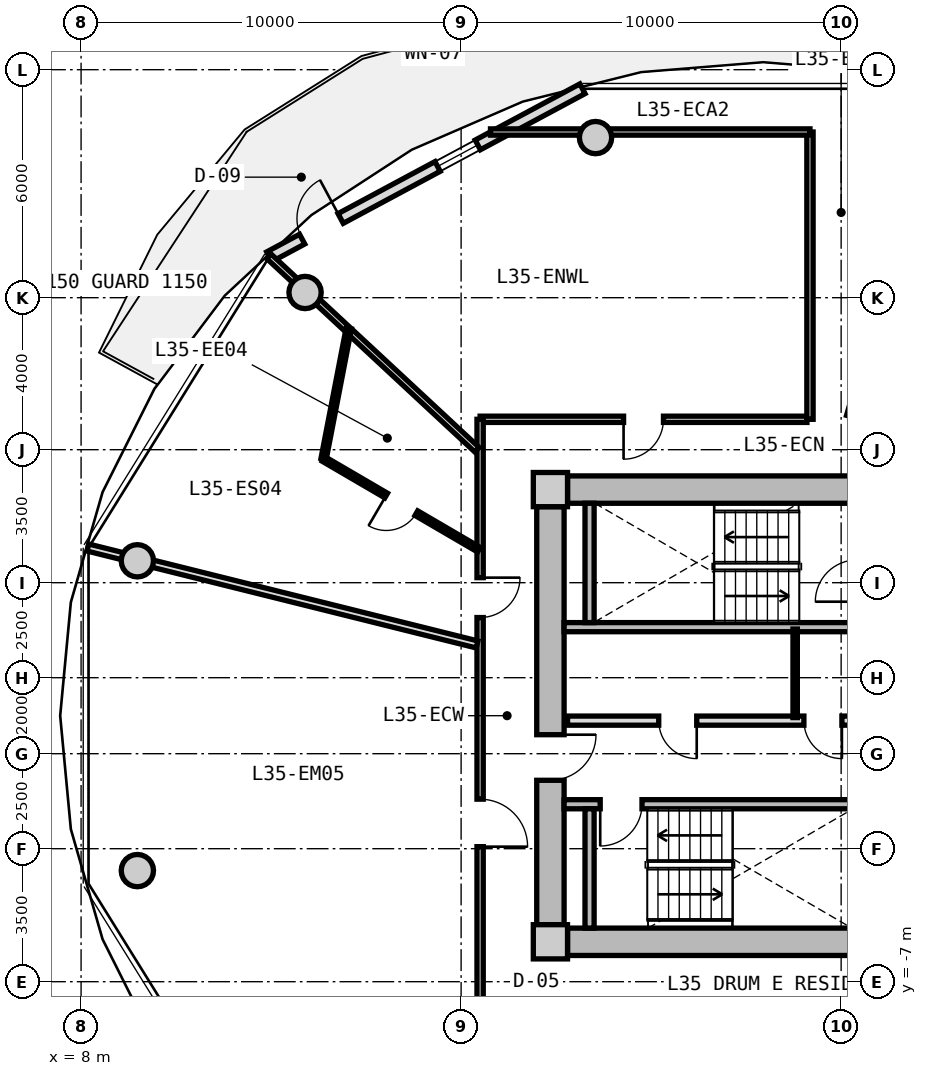
"""IFC4 building model, lengths in metres.
Left out: names, types, materials, properties, quantities, classifications, styles, units other than length and angle.
Written with IfcOpenShell. Run it as: python <this file> out.ifc"""

import sys

from ifc_helpers import new_model, si_unit, direction, frame, frame_2d, origin, origin_2d, place, context, subcontext, project, spatial, rectangle, circle, extrude, source, transform, mapped, element, fill, save


model = new_model("IFC4")
c1 = context("Model", 3, precision=1e-05, world=origin(), true_north=direction((0.0, 1.0)))
c2 = subcontext(c1, "Body", "Model", "MODEL_VIEW")
j1 = project(units=[si_unit("LENGTHUNIT", "METRE"), si_unit("PLANEANGLEUNIT", "RADIAN")], contexts=[c1])
p1 = place(None, origin())
s1 = spatial("IfcSite", under=j1, at=p1, CompositionType="ELEMENT")
p2 = place(p1, origin())
s2 = spatial("IfcBuilding", under=s1, at=p2, CompositionType="ELEMENT")
p3 = place(p2, frame((0.0, 0.0, 114.55)))
s3 = spatial("IfcBuildingStorey", under=s2, at=p3, CompositionType="ELEMENT", Elevation=114.55)
m1 = source(origin(), c2, "Body", "SweptSolid", [
    extrude(rectangle(XDim=0.9, YDim=0.9, at=origin_2d()), origin(), (0.0, 0.0, 1.0), 3.05),
])
for number, where, z_axis, x_axis in (
    (1, (20.35, -5.95, 0.0), (0.0, 0.0, 1.0), (1.0, 0.0, 0.0)),
    (2, (20.35, 5.95, 0.0), (0.0, 0.0, 1.0), (1.0, 0.0, 0.0)),
):
    element("IfcColumn", number, at=place(p3, frame(where, z_axis=z_axis, x_axis=x_axis)), inside=s3, PredefinedType="COLUMN", context=c2, shape_type="MappedRepresentation", body=[
        mapped(m1, transform((0.0, 0.0, 0.0), x_axis=(1.0, 0.0, 0.0), y_axis=(0.0, 1.0, 0.0), z_axis=(0.0, 0.0, 1.0), scale=1.0)),
    ])
m2 = source(origin(), c2, "Body", "SweptSolid", [
    extrude(rectangle(XDim=14.4, YDim=0.72, at=frame_2d((7.2, 0.0))), origin(), (0.0, 0.0, 1.0), 2.79),
])
for number, where, z_axis, x_axis in (
    (3, (20.8, 5.95, 0.0), (0.0, 0.0, 1.0), (1.0, 0.0, 0.0)),
    (4, (35.2, -5.95, 0.0), (0.0, 0.0, 1.0), (-1.0, 0.0, 0.0)),
):
    element("IfcWall", number, at=place(p3, frame(where, z_axis=z_axis, x_axis=x_axis)), inside=s3, PredefinedType="SHEAR", context=c2, shape_type="MappedRepresentation", body=[
        mapped(m2, transform((0.0, 0.0, 0.0), x_axis=(1.0, 0.0, 0.0), y_axis=(0.0, 1.0, 0.0), z_axis=(0.0, 0.0, 1.0), scale=1.0)),
    ])
m3 = source(origin(), c2, "Body", "SweptSolid", [
    extrude(rectangle(XDim=11.0, YDim=0.72, at=frame_2d((5.5, 0.0))), origin(), (0.0, 0.0, 1.0), 2.79),
])
p4 = place(p3, frame((20.35, -5.5, 0.0), z_axis=(0.0, 0.0, 1.0), x_axis=(0.0, 1.0, 0.0)))
e5 = element("IfcWall", 5, at=p4, inside=s3, PredefinedType="SHEAR", context=c2, shape_type="MappedRepresentation", body=[
    mapped(m3, transform((0.0, 0.0, 0.0), x_axis=(1.0, 0.0, 0.0), y_axis=(0.0, 1.0, 0.0), z_axis=(0.0, 0.0, 1.0), scale=1.0)),
])
p5 = place(p4, frame((3.8, 0.0, 0.0)))
e6 = element("IfcOpeningElement", 6, at=p5, cuts=e5, PredefinedType="OPENING", context=c2, shape_type="SweptSolid", body=[
    extrude(rectangle(XDim=1.2, YDim=2.15, at=frame_2d((0.6, 1.075))), frame((0.0, 0.37, 0.0), z_axis=(0.0, -1.0, 0.0), x_axis=(1.0, 0.0, 0.0)), (0.0, 0.0, 1.0), 0.74),
])
m4 = source(origin(), c2, "Body", "SweptSolid", [
    extrude(circle(Radius=0.425, at=origin_2d()), origin(), (0.0, 0.0, 1.0), 3.05),
])
for number, where, z_axis, x_axis in (
    (7, (21.537, 15.213, 0.0), (0.0, 0.0, 1.0), (1.0, 0.0, 0.0)),
    (8, (13.894, 11.137, 0.0), (0.0, 0.0, 1.0), (1.0, 0.0, 0.0)),
    (9, (9.481, 4.076, 0.0), (0.0, 0.0, 1.0), (1.0, 0.0, 0.0)),
    (10, (9.481, -4.076, 0.0), (0.0, 0.0, 1.0), (1.0, 0.0, 0.0)),
):
    element("IfcColumn", number, at=place(p3, frame(where, z_axis=z_axis, x_axis=x_axis)), inside=s3, PredefinedType="COLUMN", context=c2, shape_type="MappedRepresentation", body=[
        mapped(m4, transform((0.0, 0.0, 0.0), x_axis=(1.0, 0.0, 0.0), y_axis=(0.0, 1.0, 0.0), z_axis=(0.0, 0.0, 1.0), scale=1.0)),
    ])
m5 = source(origin(), c2, "Body", "SweptSolid", [
    extrude(rectangle(XDim=9.351, YDim=0.29, at=frame_2d((4.675, 0.0))), origin(), (0.0, 0.0, 1.0), 2.79),
])
p6 = place(p3, frame((12.953, 12.077, 0.0), z_axis=(0.0, 0.0, 1.0), x_axis=(0.881184411073, 0.472772708267, 0.0)))
e11 = element("IfcWall", 11, at=p6, inside=s3, PredefinedType="SOLIDWALL", context=c2, shape_type="MappedRepresentation", body=[
    mapped(m5, transform((0.0, 0.0, 0.0), x_axis=(1.0, 0.0, 0.0), y_axis=(0.0, 1.0, 0.0), z_axis=(0.0, 0.0, 1.0), scale=1.0)),
])
p7 = place(p6, frame((0.98, 0.0, 0.0)))
e12 = element("IfcOpeningElement", 12, at=p7, cuts=e11, PredefinedType="OPENING", context=c2, shape_type="SweptSolid", body=[
    extrude(rectangle(XDim=1.15, YDim=2.25, at=frame_2d((0.575, 1.125))), frame((0.0, 0.155, 0.0), z_axis=(0.0, -1.0, 0.0), x_axis=(1.0, 0.0, 0.0)), (0.0, 0.0, 1.0), 0.31),
])
p8 = place(p6, frame((5.025, 0.0, 0.85)))
e13 = element("IfcOpeningElement", 13, at=p8, cuts=e11, PredefinedType="OPENING", context=c2, shape_type="SweptSolid", body=[
    extrude(rectangle(XDim=1.2, YDim=1.5, at=frame_2d((0.6, 0.75))), frame((0.0, 0.155, 0.0), z_axis=(0.0, -1.0, 0.0), x_axis=(1.0, 0.0, 0.0)), (0.0, 0.0, 1.0), 0.31),
])
m6 = source(origin(), c2, "Body", "SweptSolid", [
    extrude(rectangle(XDim=7.83, YDim=0.24, at=frame_2d((3.915, 0.0))), origin(), (0.0, 0.0, 1.0), 2.79),
])
p9 = place(p3, frame((20.71, 2.33, 0.0), z_axis=(0.0, 0.0, 1.0), x_axis=(1.0, 0.0, 0.0)))
e14 = element("IfcWall", 14, at=p9, inside=s3, PredefinedType="PARTITIONING", context=c2, shape_type="MappedRepresentation", body=[
    mapped(m6, transform((0.0, 0.0, 0.0), x_axis=(1.0, 0.0, 0.0), y_axis=(0.0, 1.0, 0.0), z_axis=(0.0, 0.0, 1.0), scale=1.0)),
])
m7 = source(origin(), c2, "Body", "SweptSolid", [
    extrude(rectangle(XDim=3.14, YDim=0.24, at=frame_2d((1.57, 0.0))), origin(), (0.0, 0.0, 1.0), 2.79),
])
p10 = place(p3, frame((21.38, 2.45, 0.0), z_axis=(0.0, 0.0, 1.0), x_axis=(0.0, 1.0, 0.0)))
e15 = element("IfcWall", 15, at=p10, inside=s3, PredefinedType="PARTITIONING", context=c2, shape_type="MappedRepresentation", body=[
    mapped(m7, transform((0.0, 0.0, 0.0), x_axis=(1.0, 0.0, 0.0), y_axis=(0.0, 1.0, 0.0), z_axis=(0.0, 0.0, 1.0), scale=1.0)),
])
p11 = place(p3, frame((20.71, -2.33, 0.0), z_axis=(0.0, 0.0, 1.0), x_axis=(1.0, 0.0, 0.0)))
e16 = element("IfcWall", 16, at=p11, inside=s3, PredefinedType="PARTITIONING", context=c2, shape_type="MappedRepresentation", body=[
    mapped(m6, transform((0.0, 0.0, 0.0), x_axis=(1.0, 0.0, 0.0), y_axis=(0.0, 1.0, 0.0), z_axis=(0.0, 0.0, 1.0), scale=1.0)),
])
p12 = place(p11, frame((0.95, 0.0, 0.0)))
e17 = element("IfcOpeningElement", 17, at=p12, cuts=e16, PredefinedType="OPENING", context=c2, shape_type="SweptSolid", body=[
    extrude(rectangle(XDim=1.1, YDim=2.15, at=frame_2d((0.55, 1.075))), frame((0.0, 0.13, 0.0), z_axis=(0.0, -1.0, 0.0), x_axis=(1.0, 0.0, 0.0)), (0.0, 0.0, 1.0), 0.26),
])
p13 = place(p3, frame((21.38, -5.59, 0.0), z_axis=(0.0, 0.0, 1.0), x_axis=(0.0, 1.0, 0.0)))
e18 = element("IfcWall", 18, at=p13, inside=s3, PredefinedType="PARTITIONING", context=c2, shape_type="MappedRepresentation", body=[
    mapped(m7, transform((0.0, 0.0, 0.0), x_axis=(1.0, 0.0, 0.0), y_axis=(0.0, 1.0, 0.0), z_axis=(0.0, 0.0, 1.0), scale=1.0)),
])
m8 = source(origin(), c2, "Body", "SweptSolid", [
    extrude(rectangle(XDim=7.62, YDim=0.24, at=frame_2d((3.81, 0.0))), origin(), (0.0, 0.0, 1.0), 2.775),
])
p14 = place(p3, frame((20.8, -0.13, 0.0), z_axis=(0.0, 0.0, 1.0), x_axis=(1.0, 0.0, 0.0)))
e19 = element("IfcWall", 19, at=p14, inside=s3, PredefinedType="PARTITIONING", context=c2, shape_type="MappedRepresentation", body=[
    mapped(m8, transform((0.0, 0.0, 0.0), x_axis=(1.0, 0.0, 0.0), y_axis=(0.0, 1.0, 0.0), z_axis=(0.0, 0.0, 1.0), scale=1.0)),
])
p15 = place(p14, frame((6.22, 0.0, 0.0)))
e20 = element("IfcOpeningElement", 20, at=p15, cuts=e19, PredefinedType="OPENING", context=c2, shape_type="SweptSolid", body=[
    extrude(rectangle(XDim=1.0, YDim=2.1, at=frame_2d((0.5, 1.05))), frame((0.0, 0.13, 0.0), z_axis=(0.0, -1.0, 0.0), x_axis=(1.0, 0.0, 0.0)), (0.0, 0.0, 1.0), 0.26),
])
p16 = place(p14, frame((2.4, 0.0, 0.0)))
e21 = element("IfcOpeningElement", 21, at=p16, cuts=e19, PredefinedType="OPENING", context=c2, shape_type="SweptSolid", body=[
    extrude(rectangle(XDim=1.0, YDim=2.1, at=frame_2d((0.5, 1.05))), frame((0.0, 0.13, 0.0), z_axis=(0.0, -1.0, 0.0), x_axis=(1.0, 0.0, 0.0)), (0.0, 0.0, 1.0), 0.26),
])
m9 = source(origin(), c2, "Body", "SweptSolid", [
    extrude(rectangle(XDim=2.33, YDim=0.115, at=frame_2d((1.165, 0.0))), origin(), (0.0, 0.0, 1.0), 2.775),
])
p17 = place(p3, frame((26.79, -0.05, 0.0), z_axis=(0.0, 0.0, 1.0), x_axis=(0.0, 1.0, 0.0)))
e22 = element("IfcWall", 22, at=p17, inside=s3, PredefinedType="PARTITIONING", context=c2, shape_type="MappedRepresentation", body=[
    mapped(m9, transform((0.0, 0.0, 0.0), x_axis=(1.0, 0.0, 0.0), y_axis=(0.0, 1.0, 0.0), z_axis=(0.0, 0.0, 1.0), scale=1.0)),
])
m10 = source(origin(), c2, "Body", "SweptSolid", [
    extrude(rectangle(XDim=8.6, YDim=0.165, at=frame_2d((4.3, 0.0))), origin(), (0.0, 0.0, 1.0), 2.775),
])
p18 = place(p3, frame((18.5, 7.8, 0.0), z_axis=(0.0, 0.0, 1.0), x_axis=(1.0, 0.0, 0.0)))
e23 = element("IfcWall", 23, at=p18, inside=s3, PredefinedType="PARTITIONING", context=c2, shape_type="MappedRepresentation", body=[
    mapped(m10, transform((0.0, 0.0, 0.0), x_axis=(1.0, 0.0, 0.0), y_axis=(0.0, 1.0, 0.0), z_axis=(0.0, 0.0, 1.0), scale=1.0)),
])
p19 = place(p18, frame((3.775, 0.0, 0.0)))
e24 = element("IfcOpeningElement", 24, at=p19, cuts=e23, PredefinedType="OPENING", context=c2, shape_type="SweptSolid", body=[
    extrude(rectangle(XDim=1.05, YDim=2.15, at=frame_2d((0.525, 1.075))), frame((0.0, 0.093, 0.0), z_axis=(0.0, -1.0, 0.0), x_axis=(1.0, 0.0, 0.0)), (0.0, 0.0, 1.0), 0.185),
])
m11 = source(origin(), c2, "Body", "SweptSolid", [
    extrude(rectangle(XDim=15.6, YDim=0.165, at=frame_2d((7.8, 0.0))), origin(), (0.0, 0.0, 1.0), 2.775),
])
p20 = place(p3, frame((18.5, -7.8, 0.0), z_axis=(0.0, 0.0, 1.0), x_axis=(0.0, 1.0, 0.0)))
e25 = element("IfcWall", 25, at=p20, inside=s3, PredefinedType="PARTITIONING", context=c2, shape_type="MappedRepresentation", body=[
    mapped(m11, transform((0.0, 0.0, 0.0), x_axis=(1.0, 0.0, 0.0), y_axis=(0.0, 1.0, 0.0), z_axis=(0.0, 0.0, 1.0), scale=1.0)),
])
p21 = place(p20, frame((10.383, 0.0, 0.0)))
e26 = element("IfcOpeningElement", 26, at=p21, cuts=e25, PredefinedType="OPENING", context=c2, shape_type="SweptSolid", body=[
    extrude(rectangle(XDim=1.05, YDim=2.15, at=frame_2d((0.525, 1.075))), frame((0.0, 0.093, 0.0), z_axis=(0.0, -1.0, 0.0), x_axis=(1.0, 0.0, 0.0)), (0.0, 0.0, 1.0), 0.185),
])
p22 = place(p20, frame((4.353, 0.0, 0.0)))
e27 = element("IfcOpeningElement", 27, at=p22, cuts=e25, PredefinedType="OPENING", context=c2, shape_type="SweptSolid", body=[
    extrude(rectangle(XDim=1.25, YDim=2.2, at=frame_2d((0.625, 1.1))), frame((0.0, 0.093, 0.0), z_axis=(0.0, -1.0, 0.0), x_axis=(1.0, 0.0, 0.0)), (0.0, 0.0, 1.0), 0.185),
])
m12 = source(origin(), c2, "Body", "SweptSolid", [
    extrude(rectangle(XDim=8.989, YDim=0.165, at=frame_2d((4.495, 0.0))), origin(), (0.0, 0.0, 1.0), 2.275),
])
p23 = place(p3, frame((28.222, 7.88, 0.0), z_axis=(0.0, 0.0, 1.0), x_axis=(0.27702323008, 0.960863221274, 0.0)))
e28 = element("IfcWall", 28, at=p23, inside=s3, PredefinedType="PARTITIONING", context=c2, shape_type="MappedRepresentation", body=[
    mapped(m12, transform((0.0, 0.0, 0.0), x_axis=(1.0, 0.0, 0.0), y_axis=(0.0, 1.0, 0.0), z_axis=(0.0, 0.0, 1.0), scale=1.0)),
])
m13 = source(origin(), c2, "Body", "SweptSolid", [
    extrude(rectangle(XDim=7.482, YDim=0.165, at=frame_2d((3.741, 0.0))), origin(), (0.0, 0.0, 1.0), 2.275),
])
p24 = place(p3, frame((18.42, 6.998, 0.0), z_axis=(0.0, 0.0, 1.0), x_axis=(-0.732508698043, 0.680757671489, 0.0)))
e29 = element("IfcWall", 29, at=p24, inside=s3, PredefinedType="PARTITIONING", context=c2, shape_type="MappedRepresentation", body=[
    mapped(m13, transform((0.0, 0.0, 0.0), x_axis=(1.0, 0.0, 0.0), y_axis=(0.0, 1.0, 0.0), z_axis=(0.0, 0.0, 1.0), scale=1.0)),
])
m14 = source(origin(), c2, "Body", "SweptSolid", [
    extrude(rectangle(XDim=7.56, YDim=0.165, at=frame_2d((3.78, 0.0))), origin(), (0.0, 0.0, 1.0), 2.775),
])
p25 = place(p3, frame((27.18, 7.8, 0.0), z_axis=(0.0, 0.0, 1.0), x_axis=(0.0, 1.0, 0.0)))
e30 = element("IfcWall", 30, at=p25, inside=s3, PredefinedType="PARTITIONING", context=c2, shape_type="MappedRepresentation", body=[
    mapped(m14, transform((0.0, 0.0, 0.0), x_axis=(1.0, 0.0, 0.0), y_axis=(0.0, 1.0, 0.0), z_axis=(0.0, 0.0, 1.0), scale=1.0)),
])
m15 = source(origin(), c2, "Body", "SweptSolid", [
    extrude(rectangle(XDim=8.407, YDim=0.165, at=frame_2d((4.204, 0.0))), origin(), (0.0, 0.0, 1.0), 2.275),
])
p26 = place(p3, frame((18.773, 15.36, 0.0), z_axis=(0.0, 0.0, 1.0), x_axis=(1.0, 0.0, 0.0)))
e31 = element("IfcWall", 31, at=p26, inside=s3, PredefinedType="PARTITIONING", context=c2, shape_type="MappedRepresentation", body=[
    mapped(m15, transform((0.0, 0.0, 0.0), x_axis=(1.0, 0.0, 0.0), y_axis=(0.0, 1.0, 0.0), z_axis=(0.0, 0.0, 1.0), scale=1.0)),
])
m16 = source(origin(), c2, "Body", "SweptSolid", [
    extrude(rectangle(XDim=10.556, YDim=0.19, at=frame_2d((5.278, 0.0))), origin(), (0.0, 0.0, 1.0), 2.275),
])
p27 = place(p3, frame((18.42, 1.875, 0.0), z_axis=(0.0, 0.0, 1.0), x_axis=(-0.970363857851, 0.241648470667, 0.0)))
e32 = element("IfcWall", 32, at=p27, inside=s3, PredefinedType="PARTITIONING", context=c2, shape_type="MappedRepresentation", body=[
    mapped(m16, transform((0.0, 0.0, 0.0), x_axis=(1.0, 0.0, 0.0), y_axis=(0.0, 1.0, 0.0), z_axis=(0.0, 0.0, 1.0), scale=1.0)),
])
m17 = source(origin(), c2, "Body", "SweptSolid", [
    extrude(rectangle(XDim=4.735, YDim=0.14, at=frame_2d((2.368, 0.0))), origin(), (0.0, 0.0, 1.0), 2.775),
])
p28 = place(p3, frame((18.47, 4.368, 0.0), z_axis=(0.0, 0.0, 1.0), x_axis=(-0.863537576642, 0.504284496814, 0.0)))
e33 = element("IfcWall", 33, at=p28, inside=s3, PredefinedType="PARTITIONING", context=c2, shape_type="MappedRepresentation", body=[
    mapped(m17, transform((0.0, 0.0, 0.0), x_axis=(1.0, 0.0, 0.0), y_axis=(0.0, 1.0, 0.0), z_axis=(0.0, 0.0, 1.0), scale=1.0)),
])
p29 = place(p28, frame((1.908, 0.0, 0.0)))
e34 = element("IfcOpeningElement", 34, at=p29, cuts=e33, PredefinedType="OPENING", context=c2, shape_type="SweptSolid", body=[
    extrude(rectangle(XDim=0.92, YDim=2.1, at=frame_2d((0.46, 1.05))), frame((0.0, 0.08, 0.0), z_axis=(0.0, -1.0, 0.0), x_axis=(1.0, 0.0, 0.0)), (0.0, 0.0, 1.0), 0.16),
])
m18 = source(origin(), c2, "Body", "SweptSolid", [
    extrude(rectangle(XDim=3.499, YDim=0.14, at=frame_2d((1.75, 0.0))), origin(), (0.0, 0.0, 1.0), 2.775),
])
p30 = place(p3, frame((14.381, 6.756, 0.0), z_axis=(0.0, 0.0, 1.0), x_axis=(0.18957713629, 0.981865830649, 0.0)))
e35 = element("IfcWall", 35, at=p30, inside=s3, PredefinedType="PARTITIONING", context=c2, shape_type="MappedRepresentation", body=[
    mapped(m18, transform((0.0, 0.0, 0.0), x_axis=(1.0, 0.0, 0.0), y_axis=(0.0, 1.0, 0.0), z_axis=(0.0, 0.0, 1.0), scale=1.0)),
])
m19 = source(origin(), c2, "Body", "SweptSolid", [
    extrude(rectangle(XDim=1.15, YDim=2.25, at=frame_2d((0.575, 1.125))), frame((0.0, 0.025, 0.0), z_axis=(0.0, -1.0, 0.0), x_axis=(1.0, 0.0, 0.0)), (0.0, 0.0, 1.0), 0.05),
])
p31 = place(p7, origin())
e36 = element("IfcDoor", 36, at=p31, inside=s3, OperationType="SINGLE_SWING_RIGHT", PredefinedType="DOOR", context=c2, shape_type="MappedRepresentation", body=[
    mapped(m19, transform((0.0, 0.0, 0.0), x_axis=(1.0, 0.0, 0.0), y_axis=(0.0, 1.0, 0.0), z_axis=(0.0, 0.0, 1.0), scale=1.0)),
])
fill(e12, e36)
m20 = source(origin(), c2, "Body", "SweptSolid", [
    extrude(rectangle(XDim=1.2, YDim=1.5, at=frame_2d((0.6, 0.75))), frame((0.0, 0.03, 0.0), z_axis=(0.0, -1.0, 0.0), x_axis=(1.0, 0.0, 0.0)), (0.0, 0.0, 1.0), 0.06),
])
p32 = place(p8, origin())
e37 = element("IfcWindow", 37, at=p32, inside=s3, PartitioningType="SINGLE_PANEL", PredefinedType="WINDOW", context=c2, shape_type="MappedRepresentation", body=[
    mapped(m20, transform((0.0, 0.0, 0.0), x_axis=(1.0, 0.0, 0.0), y_axis=(0.0, 1.0, 0.0), z_axis=(0.0, 0.0, 1.0), scale=1.0)),
])
fill(e13, e37)
m21 = source(origin(), c2, "Body", "SweptSolid", [
    extrude(rectangle(XDim=1.1, YDim=2.15, at=frame_2d((0.55, 1.075))), frame((0.0, 0.025, 0.0), z_axis=(0.0, -1.0, 0.0), x_axis=(1.0, 0.0, 0.0)), (0.0, 0.0, 1.0), 0.05),
])
p33 = place(p12, frame((1.1, 0.0, 0.0), z_axis=(0.0, 0.0, 1.0), x_axis=(-1.0, 0.0, 0.0)))
e38 = element("IfcDoor", 38, at=p33, inside=s3, OperationType="SINGLE_SWING_RIGHT", PredefinedType="DOOR", context=c2, shape_type="MappedRepresentation", body=[
    mapped(m21, transform((0.0, 0.0, 0.0), x_axis=(1.0, 0.0, 0.0), y_axis=(0.0, 1.0, 0.0), z_axis=(0.0, 0.0, 1.0), scale=1.0)),
])
fill(e17, e38)
m22 = source(origin(), c2, "Body", "SweptSolid", [
    extrude(rectangle(XDim=1.2, YDim=2.15, at=frame_2d((0.6, 1.075))), frame((0.0, 0.025, 0.0), z_axis=(0.0, -1.0, 0.0), x_axis=(1.0, 0.0, 0.0)), (0.0, 0.0, 1.0), 0.05),
])
p34 = place(p5, frame((1.2, 0.0, 0.0), z_axis=(0.0, 0.0, 1.0), x_axis=(-1.0, 0.0, 0.0)))
e39 = element("IfcDoor", 39, at=p34, inside=s3, OperationType="SINGLE_SWING_LEFT", PredefinedType="DOOR", context=c2, shape_type="MappedRepresentation", body=[
    mapped(m22, transform((0.0, 0.0, 0.0), x_axis=(1.0, 0.0, 0.0), y_axis=(0.0, 1.0, 0.0), z_axis=(0.0, 0.0, 1.0), scale=1.0)),
])
fill(e6, e39)
m23 = source(origin(), c2, "Body", "SweptSolid", [
    extrude(rectangle(XDim=1.0, YDim=2.1, at=frame_2d((0.5, 1.05))), frame((0.0, 0.025, 0.0), z_axis=(0.0, -1.0, 0.0), x_axis=(1.0, 0.0, 0.0)), (0.0, 0.0, 1.0), 0.05),
])
p35 = place(p15, frame((1.0, 0.0, 0.0), z_axis=(0.0, 0.0, 1.0), x_axis=(-1.0, 0.0, 0.0)))
e40 = element("IfcDoor", 40, at=p35, inside=s3, OperationType="SINGLE_SWING_LEFT", PredefinedType="DOOR", context=c2, shape_type="MappedRepresentation", body=[
    mapped(m23, transform((0.0, 0.0, 0.0), x_axis=(1.0, 0.0, 0.0), y_axis=(0.0, 1.0, 0.0), z_axis=(0.0, 0.0, 1.0), scale=1.0)),
])
fill(e20, e40)
p36 = place(p16, frame((1.0, 0.0, 0.0), z_axis=(0.0, 0.0, 1.0), x_axis=(-1.0, 0.0, 0.0)))
e41 = element("IfcDoor", 41, at=p36, inside=s3, OperationType="SINGLE_SWING_LEFT", PredefinedType="DOOR", context=c2, shape_type="MappedRepresentation", body=[
    mapped(m23, transform((0.0, 0.0, 0.0), x_axis=(1.0, 0.0, 0.0), y_axis=(0.0, 1.0, 0.0), z_axis=(0.0, 0.0, 1.0), scale=1.0)),
])
fill(e21, e41)
m24 = source(origin(), c2, "Body", "SweptSolid", [
    extrude(rectangle(XDim=1.05, YDim=2.15, at=frame_2d((0.525, 1.075))), frame((0.0, 0.025, 0.0), z_axis=(0.0, -1.0, 0.0), x_axis=(1.0, 0.0, 0.0)), (0.0, 0.0, 1.0), 0.05),
])
p37 = place(p19, frame((1.05, 0.0, 0.0), z_axis=(0.0, 0.0, 1.0), x_axis=(-1.0, 0.0, 0.0)))
e42 = element("IfcDoor", 42, at=p37, inside=s3, OperationType="SINGLE_SWING_RIGHT", PredefinedType="DOOR", context=c2, shape_type="MappedRepresentation", body=[
    mapped(m24, transform((0.0, 0.0, 0.0), x_axis=(1.0, 0.0, 0.0), y_axis=(0.0, 1.0, 0.0), z_axis=(0.0, 0.0, 1.0), scale=1.0)),
])
fill(e24, e42)
p38 = place(p21, frame((1.05, 0.0, 0.0), z_axis=(0.0, 0.0, 1.0), x_axis=(-1.0, 0.0, 0.0)))
e43 = element("IfcDoor", 43, at=p38, inside=s3, OperationType="SINGLE_SWING_LEFT", PredefinedType="DOOR", context=c2, shape_type="MappedRepresentation", body=[
    mapped(m24, transform((0.0, 0.0, 0.0), x_axis=(1.0, 0.0, 0.0), y_axis=(0.0, 1.0, 0.0), z_axis=(0.0, 0.0, 1.0), scale=1.0)),
])
fill(e26, e43)
m25 = source(origin(), c2, "Body", "SweptSolid", [
    extrude(rectangle(XDim=0.92, YDim=2.1, at=frame_2d((0.46, 1.05))), frame((0.0, 0.025, 0.0), z_axis=(0.0, -1.0, 0.0), x_axis=(1.0, 0.0, 0.0)), (0.0, 0.0, 1.0), 0.05),
])
p39 = place(p29, origin())
e44 = element("IfcDoor", 44, at=p39, inside=s3, OperationType="SINGLE_SWING_RIGHT", PredefinedType="DOOR", context=c2, shape_type="MappedRepresentation", body=[
    mapped(m25, transform((0.0, 0.0, 0.0), x_axis=(1.0, 0.0, 0.0), y_axis=(0.0, 1.0, 0.0), z_axis=(0.0, 0.0, 1.0), scale=1.0)),
])
fill(e34, e44)
m26 = source(origin(), c2, "Body", "SweptSolid", [
    extrude(rectangle(XDim=1.25, YDim=2.2, at=frame_2d((0.625, 1.1))), frame((0.0, 0.025, 0.0), z_axis=(0.0, -1.0, 0.0), x_axis=(1.0, 0.0, 0.0)), (0.0, 0.0, 1.0), 0.05),
])
p40 = place(p22, frame((1.25, 0.0, 0.0), z_axis=(0.0, 0.0, 1.0), x_axis=(-1.0, 0.0, 0.0)))
e45 = element("IfcDoor", 45, at=p40, inside=s3, OperationType="SINGLE_SWING_RIGHT", PredefinedType="DOOR", context=c2, shape_type="MappedRepresentation", body=[
    mapped(m26, transform((0.0, 0.0, 0.0), x_axis=(1.0, 0.0, 0.0), y_axis=(0.0, 1.0, 0.0), z_axis=(0.0, 0.0, 1.0), scale=1.0)),
])
fill(e27, e45)
save(model, sys.argv[1])
